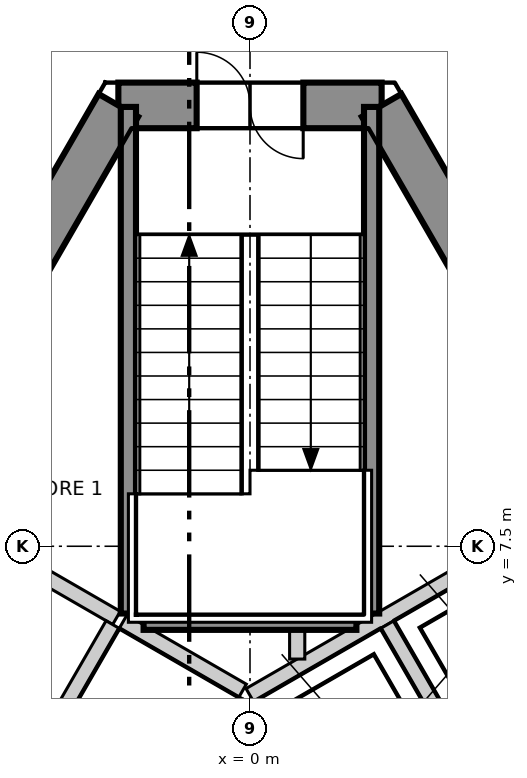
"""IFC4 building model, lengths in metres.
Left out: names, types, materials, properties, quantities, classifications, styles, units other than length and angle.
Written with IfcOpenShell. Run it as: python <this file> out.ifc"""

import sys

from ifc_helpers import new_model, si_unit, direction, frame, frame_2d, origin, place, context, subcontext, project, spatial, polyline, rectangle, outline, extrude, element, fill, save


model = new_model("IFC4")
c1 = context("Model", 3, precision=1e-05, world=origin(), true_north=direction((0.0, 1.0)))
c2 = subcontext(c1, "Body", "Model", "MODEL_VIEW")
j1 = project(units=[si_unit("LENGTHUNIT", "METRE"), si_unit("PLANEANGLEUNIT", "RADIAN")], contexts=[c1])
p1 = place(None, origin())
s1 = spatial("IfcSite", under=j1, at=p1, CompositionType="ELEMENT")
p2 = place(p1, origin())
s2 = spatial("IfcBuilding", under=s1, at=p2, CompositionType="ELEMENT")
p3 = place(p2, frame((0.0, 0.0, 300.7)))
s3 = spatial("IfcBuildingStorey", under=s2, at=p3, CompositionType="ELEMENT", Elevation=300.7)
p4 = place(p3, frame((1.732, 13.3, -0.3), z_axis=(0.0, 0.0, 1.0), x_axis=(-1.0, 0.0, 0.0)))
e1 = element("IfcWall", 1, at=p4, inside=s3, PredefinedType="SHEAR", context=c2, shape_type="SweptSolid", body=[
    extrude(outline(polyline([(-0.173, -0.3), (1.732, -0.3), (3.637, -0.3), (3.291, 0.3), (1.732, 0.3), (0.173, 0.3), (-0.173, -0.3)])), origin(), (0.0, 0.0, 1.0), 3.6),
])
p5 = place(p4, frame((1.032, 0.0, 0.3)))
e2 = element("IfcOpeningElement", 2, at=p5, cuts=e1, PredefinedType="OPENING", context=c2, shape_type="SweptSolid", body=[
    extrude(rectangle(XDim=1.4, YDim=2.1, at=frame_2d((0.7, 1.05))), frame((0.0, 0.31, 0.0), z_axis=(0.0, -1.0, 0.0), x_axis=(1.0, 0.0, 0.0)), (0.0, 0.0, 1.0), 0.62),
])
p6 = place(p3, frame((-1.732, 13.3, -0.3), z_axis=(0.0, 0.0, 1.0), x_axis=(-0.500000539815, -0.866025092122, 0.0)))
e3 = element("IfcWall", 3, at=p6, inside=s3, PredefinedType="SHEAR", context=c2, shape_type="SweptSolid", body=[
    extrude(outline(polyline([(-0.173, -0.3), (1.795, -0.3), (3.763, -0.3), (5.732, -0.3), (7.7, -0.3), (9.668, -0.301), (11.637, -0.301), (13.605, -0.301), (15.573, -0.301), (17.542, -0.301), (19.51, -0.301), (21.478, -0.301), (21.131, 0.3), (19.226, 0.3), (17.321, 0.3), (15.415, 0.3), (13.51, 0.3), (11.605, 0.3), (9.699, 0.3), (7.794, 0.3), (5.889, 0.3), (3.984, 0.3), (2.078, 0.3), (0.173, 0.3), (-0.173, -0.3)])), origin(), (0.0, 0.0, 1.0), 3.6),
])
p7 = place(p6, frame((10.102, 0.0, 0.3)))
e4 = element("IfcOpeningElement", 4, at=p7, cuts=e3, PredefinedType="OPENING", context=c2, shape_type="SweptSolid", body=[
    extrude(rectangle(XDim=1.1, YDim=2.1, at=frame_2d((0.55, 1.05))), frame((0.0, 0.31, 0.0), z_axis=(0.0, -1.0, 0.0), x_axis=(1.0, 0.0, 0.0)), (0.0, 0.0, 1.0), 0.621),
])
p8 = place(p6, frame((16.378, 0.0, 0.3)))
e5 = element("IfcOpeningElement", 5, at=p8, cuts=e3, PredefinedType="OPENING", context=c2, shape_type="SweptSolid", body=[
    extrude(rectangle(XDim=0.9, YDim=2.1, at=frame_2d((0.45, 1.05))), frame((0.0, 0.31, 0.0), z_axis=(0.0, -1.0, 0.0), x_axis=(1.0, 0.0, 0.0)), (0.0, 0.0, 1.0), 0.621),
])
p9 = place(p6, frame((4.026, 0.0, 0.3)))
e6 = element("IfcOpeningElement", 6, at=p9, cuts=e3, PredefinedType="OPENING", context=c2, shape_type="SweptSolid", body=[
    extrude(rectangle(XDim=0.9, YDim=2.1, at=frame_2d((0.45, 1.05))), frame((0.0, 0.31, 0.0), z_axis=(0.0, -1.0, 0.0), x_axis=(1.0, 0.0, 0.0)), (0.0, 0.0, 1.0), 0.621),
])
p10 = place(p3, frame((12.384, -5.15, -0.3), z_axis=(0.0, 0.0, 1.0), x_axis=(-0.500000539815, 0.866025092122, 0.0)))
e7 = element("IfcWall", 7, at=p10, inside=s3, PredefinedType="SHEAR", context=c2, shape_type="SweptSolid", body=[
    extrude(outline(polyline([(-0.173, -0.301), (1.795, -0.301), (3.763, -0.301), (5.731, -0.301), (7.7, -0.301), (9.668, -0.301), (11.636, -0.301), (13.604, -0.3), (15.573, -0.3), (17.541, -0.3), (19.509, -0.3), (21.477, -0.3), (21.131, 0.3), (19.226, 0.3), (17.321, 0.3), (15.415, 0.3), (13.51, 0.3), (11.605, 0.3), (9.699, 0.3), (7.794, 0.3), (5.889, 0.3), (3.984, 0.3), (2.078, 0.3), (0.173, 0.3), (-0.173, -0.301)])), origin(), (0.0, 0.0, 1.0), 3.6),
])
p11 = place(p10, frame((16.328, 0.0, 0.3)))
e8 = element("IfcOpeningElement", 8, at=p11, cuts=e7, PredefinedType="OPENING", context=c2, shape_type="SweptSolid", body=[
    extrude(rectangle(XDim=1.0, YDim=2.1, at=frame_2d((0.5, 1.05))), frame((0.0, 0.31, 0.0), z_axis=(0.0, -1.0, 0.0), x_axis=(1.0, 0.0, 0.0)), (0.0, 0.0, 1.0), 0.621),
])
p12 = place(p10, frame((4.777, 0.0, 0.3)))
e9 = element("IfcOpeningElement", 9, at=p12, cuts=e7, PredefinedType="OPENING", context=c2, shape_type="SweptSolid", body=[
    extrude(rectangle(XDim=0.9, YDim=2.1, at=frame_2d((0.45, 1.05))), frame((0.0, 0.31, 0.0), z_axis=(0.0, -1.0, 0.0), x_axis=(1.0, 0.0, 0.0)), (0.0, 0.0, 1.0), 0.621),
])
p13 = place(p3, frame((-2.453, 27.405, 0.0), z_axis=(0.0, 0.0, 1.0), x_axis=(-0.500000041859, -0.866025379617, 0.0)))
e10 = element("IfcWall", 10, at=p13, inside=s3, PredefinedType="ELEMENTEDWALL", context=c2, shape_type="SweptSolid", body=[
    extrude(rectangle(XDim=44.994, YDim=0.2, at=frame_2d((22.497, 0.0))), origin(), (0.0, 0.0, 1.0), 3.3),
])
p14 = place(p13, frame((2.103, 0.0, 0.9)))
e11 = element("IfcOpeningElement", 11, at=p14, cuts=e10, PredefinedType="OPENING", context=c2, shape_type="SweptSolid", body=[
    extrude(rectangle(XDim=3.7, YDim=2.2, at=frame_2d((1.85, 1.1))), frame((0.0, 0.11, 0.0), z_axis=(0.0, -1.0, 0.0), x_axis=(1.0, 0.0, 0.0)), (0.0, 0.0, 1.0), 0.22),
])
p15 = place(p13, frame((7.404, 0.0, 0.9)))
e12 = element("IfcOpeningElement", 12, at=p15, cuts=e10, PredefinedType="OPENING", context=c2, shape_type="SweptSolid", body=[
    extrude(rectangle(XDim=3.7, YDim=2.2, at=frame_2d((1.85, 1.1))), frame((0.0, 0.11, 0.0), z_axis=(0.0, -1.0, 0.0), x_axis=(1.0, 0.0, 0.0)), (0.0, 0.0, 1.0), 0.22),
])
p16 = place(p13, frame((12.705, 0.0, 0.9)))
e13 = element("IfcOpeningElement", 13, at=p16, cuts=e10, PredefinedType="OPENING", context=c2, shape_type="SweptSolid", body=[
    extrude(rectangle(XDim=3.7, YDim=2.2, at=frame_2d((1.85, 1.1))), frame((0.0, 0.11, 0.0), z_axis=(0.0, -1.0, 0.0), x_axis=(1.0, 0.0, 0.0)), (0.0, 0.0, 1.0), 0.22),
])
p17 = place(p13, frame((18.006, 0.0, 0.9)))
e14 = element("IfcOpeningElement", 14, at=p17, cuts=e10, PredefinedType="OPENING", context=c2, shape_type="SweptSolid", body=[
    extrude(rectangle(XDim=3.7, YDim=2.2, at=frame_2d((1.85, 1.1))), frame((0.0, 0.11, 0.0), z_axis=(0.0, -1.0, 0.0), x_axis=(1.0, 0.0, 0.0)), (0.0, 0.0, 1.0), 0.22),
])
p18 = place(p13, frame((23.307, 0.0, 0.9)))
e15 = element("IfcOpeningElement", 15, at=p18, cuts=e10, PredefinedType="OPENING", context=c2, shape_type="SweptSolid", body=[
    extrude(rectangle(XDim=3.7, YDim=2.2, at=frame_2d((1.85, 1.1))), frame((0.0, 0.11, 0.0), z_axis=(0.0, -1.0, 0.0), x_axis=(1.0, 0.0, 0.0)), (0.0, 0.0, 1.0), 0.22),
])
p19 = place(p13, frame((28.608, 0.0, 0.9)))
e16 = element("IfcOpeningElement", 16, at=p19, cuts=e10, PredefinedType="OPENING", context=c2, shape_type="SweptSolid", body=[
    extrude(rectangle(XDim=3.7, YDim=2.2, at=frame_2d((1.85, 1.1))), frame((0.0, 0.11, 0.0), z_axis=(0.0, -1.0, 0.0), x_axis=(1.0, 0.0, 0.0)), (0.0, 0.0, 1.0), 0.22),
])
p20 = place(p13, frame((33.909, 0.0, 0.9)))
e17 = element("IfcOpeningElement", 17, at=p20, cuts=e10, PredefinedType="OPENING", context=c2, shape_type="SweptSolid", body=[
    extrude(rectangle(XDim=3.7, YDim=2.2, at=frame_2d((1.85, 1.1))), frame((0.0, 0.11, 0.0), z_axis=(0.0, -1.0, 0.0), x_axis=(1.0, 0.0, 0.0)), (0.0, 0.0, 1.0), 0.22),
])
p21 = place(p13, frame((39.21, 0.0, 0.9)))
e18 = element("IfcOpeningElement", 18, at=p21, cuts=e10, PredefinedType="OPENING", context=c2, shape_type="SweptSolid", body=[
    extrude(rectangle(XDim=3.7, YDim=2.2, at=frame_2d((1.85, 1.1))), frame((0.0, 0.11, 0.0), z_axis=(0.0, -1.0, 0.0), x_axis=(1.0, 0.0, 0.0)), (0.0, 0.0, 1.0), 0.22),
])
p22 = place(p3, frame((24.96, -11.578, 0.0), z_axis=(0.0, 0.0, 1.0), x_axis=(-0.500002391419, 0.866024023094, 0.0)))
e19 = element("IfcWall", 19, at=p22, inside=s3, PredefinedType="ELEMENTEDWALL", context=c2, shape_type="SweptSolid", body=[
    extrude(rectangle(XDim=44.994, YDim=0.2, at=frame_2d((22.497, 0.0))), origin(), (0.0, 0.0, 1.0), 3.3),
])
p23 = place(p22, frame((2.103, 0.0, 0.9)))
e20 = element("IfcOpeningElement", 20, at=p23, cuts=e19, PredefinedType="OPENING", context=c2, shape_type="SweptSolid", body=[
    extrude(rectangle(XDim=3.7, YDim=2.2, at=frame_2d((1.85, 1.1))), frame((0.0, 0.11, 0.0), z_axis=(0.0, -1.0, 0.0), x_axis=(1.0, 0.0, 0.0)), (0.0, 0.0, 1.0), 0.22),
])
p24 = place(p22, frame((7.404, 0.0, 0.9)))
e21 = element("IfcOpeningElement", 21, at=p24, cuts=e19, PredefinedType="OPENING", context=c2, shape_type="SweptSolid", body=[
    extrude(rectangle(XDim=3.7, YDim=2.2, at=frame_2d((1.85, 1.1))), frame((0.0, 0.11, 0.0), z_axis=(0.0, -1.0, 0.0), x_axis=(1.0, 0.0, 0.0)), (0.0, 0.0, 1.0), 0.22),
])
p25 = place(p22, frame((12.705, 0.0, 0.9)))
e22 = element("IfcOpeningElement", 22, at=p25, cuts=e19, PredefinedType="OPENING", context=c2, shape_type="SweptSolid", body=[
    extrude(rectangle(XDim=3.7, YDim=2.2, at=frame_2d((1.85, 1.1))), frame((0.0, 0.11, 0.0), z_axis=(0.0, -1.0, 0.0), x_axis=(1.0, 0.0, 0.0)), (0.0, 0.0, 1.0), 0.22),
])
p26 = place(p22, frame((18.006, 0.0, 0.9)))
e23 = element("IfcOpeningElement", 23, at=p26, cuts=e19, PredefinedType="OPENING", context=c2, shape_type="SweptSolid", body=[
    extrude(rectangle(XDim=3.7, YDim=2.2, at=frame_2d((1.85, 1.1))), frame((0.0, 0.11, 0.0), z_axis=(0.0, -1.0, 0.0), x_axis=(1.0, 0.0, 0.0)), (0.0, 0.0, 1.0), 0.22),
])
p27 = place(p22, frame((23.308, 0.0, 0.9)))
e24 = element("IfcOpeningElement", 24, at=p27, cuts=e19, PredefinedType="OPENING", context=c2, shape_type="SweptSolid", body=[
    extrude(rectangle(XDim=3.7, YDim=2.2, at=frame_2d((1.85, 1.1))), frame((0.0, 0.11, 0.0), z_axis=(0.0, -1.0, 0.0), x_axis=(1.0, 0.0, 0.0)), (0.0, 0.0, 1.0), 0.22),
])
p28 = place(p22, frame((28.609, 0.0, 0.9)))
e25 = element("IfcOpeningElement", 25, at=p28, cuts=e19, PredefinedType="OPENING", context=c2, shape_type="SweptSolid", body=[
    extrude(rectangle(XDim=3.7, YDim=2.2, at=frame_2d((1.85, 1.1))), frame((0.0, 0.11, 0.0), z_axis=(0.0, -1.0, 0.0), x_axis=(1.0, 0.0, 0.0)), (0.0, 0.0, 1.0), 0.22),
])
p29 = place(p22, frame((33.91, 0.0, 0.9)))
e26 = element("IfcOpeningElement", 26, at=p29, cuts=e19, PredefinedType="OPENING", context=c2, shape_type="SweptSolid", body=[
    extrude(rectangle(XDim=3.7, YDim=2.2, at=frame_2d((1.85, 1.1))), frame((0.0, 0.11, 0.0), z_axis=(0.0, -1.0, 0.0), x_axis=(1.0, 0.0, 0.0)), (0.0, 0.0, 1.0), 0.22),
])
p30 = place(p22, frame((39.211, 0.0, 0.9)))
e27 = element("IfcOpeningElement", 27, at=p30, cuts=e19, PredefinedType="OPENING", context=c2, shape_type="SweptSolid", body=[
    extrude(rectangle(XDim=3.7, YDim=2.2, at=frame_2d((1.85, 1.1))), frame((0.0, 0.11, 0.0), z_axis=(0.0, -1.0, 0.0), x_axis=(1.0, 0.0, 0.0)), (0.0, 0.0, 1.0), 0.22),
])
p31 = place(p3, frame((-17.679, -10.12, 0.0), z_axis=(0.0, 0.0, 1.0), x_axis=(0.500008955215, 0.866020233427, 0.0)))
e28 = element("IfcWall", 28, at=p31, inside=s3, PredefinedType="PARTITIONING", context=c2, shape_type="SweptSolid", body=[
    extrude(rectangle(XDim=35.357, YDim=0.15, at=frame_2d((17.679, 0.0))), origin(), (0.0, 0.0, 1.0), 3.3),
])
p32 = place(p31, frame((31.307, 0.0, 0.0)))
e29 = element("IfcOpeningElement", 29, at=p32, cuts=e28, PredefinedType="OPENING", context=c2, shape_type="SweptSolid", body=[
    extrude(rectangle(XDim=1.0, YDim=2.1, at=frame_2d((0.5, 1.05))), frame((0.0, 0.085, 0.0), z_axis=(0.0, -1.0, 0.0), x_axis=(1.0, 0.0, 0.0)), (0.0, 0.0, 1.0), 0.17),
])
p33 = place(p31, frame((20.056, 0.0, 0.0)))
e30 = element("IfcOpeningElement", 30, at=p33, cuts=e28, PredefinedType="OPENING", context=c2, shape_type="SweptSolid", body=[
    extrude(rectangle(XDim=1.0, YDim=2.1, at=frame_2d((0.5, 1.05))), frame((0.0, 0.085, 0.0), z_axis=(0.0, -1.0, 0.0), x_axis=(1.0, 0.0, 0.0)), (0.0, 0.0, 1.0), 0.17),
])
p34 = place(p31, frame((13.253, 0.0, 0.0)))
e31 = element("IfcOpeningElement", 31, at=p34, cuts=e28, PredefinedType="OPENING", context=c2, shape_type="SweptSolid", body=[
    extrude(rectangle(XDim=1.0, YDim=2.1, at=frame_2d((0.5, 1.05))), frame((0.0, 0.085, 0.0), z_axis=(0.0, -1.0, 0.0), x_axis=(1.0, 0.0, 0.0)), (0.0, 0.0, 1.0), 0.17),
])
p35 = place(p31, frame((7.653, 0.0, 0.0)))
e32 = element("IfcOpeningElement", 32, at=p35, cuts=e28, PredefinedType="OPENING", context=c2, shape_type="SweptSolid", body=[
    extrude(rectangle(XDim=1.0, YDim=2.1, at=frame_2d((0.5, 1.05))), frame((0.0, 0.085, 0.0), z_axis=(0.0, -1.0, 0.0), x_axis=(1.0, 0.0, 0.0)), (0.0, 0.0, 1.0), 0.17),
])
p36 = place(p31, frame((2.952, 0.0, 0.0)))
e33 = element("IfcOpeningElement", 33, at=p36, cuts=e28, PredefinedType="OPENING", context=c2, shape_type="SweptSolid", body=[
    extrude(rectangle(XDim=1.0, YDim=2.1, at=frame_2d((0.5, 1.05))), frame((0.0, 0.085, 0.0), z_axis=(0.0, -1.0, 0.0), x_axis=(1.0, 0.0, 0.0)), (0.0, 0.0, 1.0), 0.17),
])
p37 = place(p3, frame((0.075, 20.37, 0.0), z_axis=(0.0, 0.0, 1.0), x_axis=(0.500009775255, -0.866019759965, 0.0)))
e34 = element("IfcWall", 34, at=p37, inside=s3, PredefinedType="PARTITIONING", context=c2, shape_type="SweptSolid", body=[
    extrude(rectangle(XDim=35.207, YDim=0.15, at=frame_2d((17.604, 0.0))), origin(), (0.0, 0.0, 1.0), 3.3),
])
p38 = place(p37, frame((31.307, 0.0, 0.0)))
e35 = element("IfcOpeningElement", 35, at=p38, cuts=e34, PredefinedType="OPENING", context=c2, shape_type="SweptSolid", body=[
    extrude(rectangle(XDim=1.0, YDim=2.1, at=frame_2d((0.5, 1.05))), frame((0.0, 0.085, 0.0), z_axis=(0.0, -1.0, 0.0), x_axis=(1.0, 0.0, 0.0)), (0.0, 0.0, 1.0), 0.17),
])
p39 = place(p37, frame((20.355, 0.0, 0.0)))
e36 = element("IfcOpeningElement", 36, at=p39, cuts=e34, PredefinedType="OPENING", context=c2, shape_type="SweptSolid", body=[
    extrude(rectangle(XDim=1.0, YDim=2.1, at=frame_2d((0.5, 1.05))), frame((0.0, 0.085, 0.0), z_axis=(0.0, -1.0, 0.0), x_axis=(1.0, 0.0, 0.0)), (0.0, 0.0, 1.0), 0.17),
])
p40 = place(p37, frame((24.355, 0.0, 0.0)))
e37 = element("IfcOpeningElement", 37, at=p40, cuts=e34, PredefinedType="OPENING", context=c2, shape_type="SweptSolid", body=[
    extrude(rectangle(XDim=0.9, YDim=2.1, at=frame_2d((0.45, 1.05))), frame((0.0, 0.085, 0.0), z_axis=(0.0, -1.0, 0.0), x_axis=(1.0, 0.0, 0.0)), (0.0, 0.0, 1.0), 0.17),
])
p41 = place(p37, frame((22.255, 0.0, 0.0)))
e38 = element("IfcOpeningElement", 38, at=p41, cuts=e34, PredefinedType="OPENING", context=c2, shape_type="SweptSolid", body=[
    extrude(rectangle(XDim=0.9, YDim=2.1, at=frame_2d((0.45, 1.05))), frame((0.0, 0.085, 0.0), z_axis=(0.0, -1.0, 0.0), x_axis=(1.0, 0.0, 0.0)), (0.0, 0.0, 1.0), 0.17),
])
p42 = place(p37, frame((8.453, 0.0, 0.0)))
e39 = element("IfcOpeningElement", 39, at=p42, cuts=e34, PredefinedType="OPENING", context=c2, shape_type="SweptSolid", body=[
    extrude(rectangle(XDim=1.0, YDim=2.1, at=frame_2d((0.5, 1.05))), frame((0.0, 0.085, 0.0), z_axis=(0.0, -1.0, 0.0), x_axis=(1.0, 0.0, 0.0)), (0.0, 0.0, 1.0), 0.17),
])
p43 = place(p37, frame((13.753, 0.0, 0.0)))
e40 = element("IfcOpeningElement", 40, at=p43, cuts=e34, PredefinedType="OPENING", context=c2, shape_type="SweptSolid", body=[
    extrude(rectangle(XDim=0.9, YDim=2.1, at=frame_2d((0.45, 1.05))), frame((0.0, 0.085, 0.0), z_axis=(0.0, -1.0, 0.0), x_axis=(1.0, 0.0, 0.0)), (0.0, 0.0, 1.0), 0.17),
])
p44 = place(p37, frame((11.553, 0.0, 0.0)))
e41 = element("IfcOpeningElement", 41, at=p44, cuts=e34, PredefinedType="OPENING", context=c2, shape_type="SweptSolid", body=[
    extrude(rectangle(XDim=0.9, YDim=2.1, at=frame_2d((0.45, 1.05))), frame((0.0, 0.085, 0.0), z_axis=(0.0, -1.0, 0.0), x_axis=(1.0, 0.0, 0.0)), (0.0, 0.0, 1.0), 0.17),
])
p45 = place(p37, frame((2.951, 0.0, 0.0)))
e42 = element("IfcOpeningElement", 42, at=p45, cuts=e34, PredefinedType="OPENING", context=c2, shape_type="SweptSolid", body=[
    extrude(rectangle(XDim=1.0, YDim=2.1, at=frame_2d((0.5, 1.05))), frame((0.0, 0.085, 0.0), z_axis=(0.0, -1.0, 0.0), x_axis=(1.0, 0.0, 0.0)), (0.0, 0.0, 1.0), 0.17),
])
p46 = place(p3, frame((-0.002, 5.541, 0.0), z_axis=(0.0, 0.0, 1.0), x_axis=(0.86600155993, 0.500041296494, 0.0)))
e43 = element("IfcWall", 43, at=p46, inside=s3, PredefinedType="SOLIDWALL", context=c2, shape_type="SweptSolid", body=[
    extrude(rectangle(XDim=4.132, YDim=0.2, at=frame_2d((2.066, 0.0))), origin(), (0.0, 0.0, 1.0), 3.3),
])
p47 = place(p3, frame((1.578, 2.874, 0.0), z_axis=(0.0, 0.0, 1.0), x_axis=(0.866045911672, 0.499964477614, 0.0)))
e44 = element("IfcWall", 44, at=p47, inside=s3, PredefinedType="SOLIDWALL", context=c2, shape_type="SweptSolid", body=[
    extrude(rectangle(XDim=5.327, YDim=0.2, at=frame_2d((2.663, 0.0))), origin(), (0.0, 0.0, 1.0), 3.3),
])
p48 = place(p47, frame((2.496, 0.0, 0.0)))
e45 = element("IfcOpeningElement", 45, at=p48, cuts=e44, PredefinedType="OPENING", context=c2, shape_type="SweptSolid", body=[
    extrude(rectangle(XDim=1.1, YDim=2.1, at=frame_2d((0.55, 1.05))), frame((0.0, 0.11, 0.0), z_axis=(0.0, -1.0, 0.0), x_axis=(1.0, 0.0, 0.0)), (0.0, 0.0, 1.0), 0.22),
])
p49 = place(p3, frame((1.807, 6.47, 0.0), z_axis=(0.0, 0.0, 1.0), x_axis=(0.50012328804, -0.865954211699, 0.0)))
e46 = element("IfcWall", 46, at=p49, inside=s3, PredefinedType="SOLIDWALL", context=c2, shape_type="SweptSolid", body=[
    extrude(rectangle(XDim=2.9, YDim=0.2, at=frame_2d((1.45, 0.0))), origin(), (0.0, 0.0, 1.0), 3.3),
])
p50 = place(p3, frame((-3.489, 7.557, 0.0), z_axis=(0.0, 0.0, 1.0), x_axis=(0.866010750942, -0.50002537861, 0.0)))
e47 = element("IfcWall", 47, at=p50, inside=s3, PredefinedType="SOLIDWALL", context=c2, shape_type="SweptSolid", body=[
    extrude(rectangle(XDim=2.0, YDim=0.2, at=frame_2d((1.0, 0.0))), origin(), (0.0, 0.0, 1.0), 3.3),
])
p51 = place(p3, frame((-3.257, 3.959, 0.0), z_axis=(0.0, 0.0, 1.0), x_axis=(0.50012328804, 0.865954211699, 0.0)))
e48 = element("IfcWall", 48, at=p51, inside=s3, PredefinedType="SOLIDWALL", context=c2, shape_type="SweptSolid", body=[
    extrude(rectangle(XDim=2.9, YDim=0.2, at=frame_2d((1.45, 0.0))), origin(), (0.0, 0.0, 1.0), 3.3),
])
p52 = place(p3, frame((-1.67, 6.507, 0.0), z_axis=(0.0, 0.0, 1.0), x_axis=(0.865941441609, -0.500145398563, 0.0)))
e49 = element("IfcWall", 49, at=p52, inside=s3, PredefinedType="SOLIDWALL", context=c2, shape_type="SweptSolid", body=[
    extrude(rectangle(XDim=1.815, YDim=0.2, at=frame_2d((0.908, 0.0))), origin(), (0.0, 0.0, 1.0), 3.3),
])
p53 = place(p3, frame((0.621, 6.016, 0.0), z_axis=(0.0, 0.0, 1.0), x_axis=(0.0, 1.0, 0.0)))
e50 = element("IfcWall", 50, at=p53, inside=s3, PredefinedType="SOLIDWALL", context=c2, shape_type="SweptSolid", body=[
    extrude(rectangle(XDim=0.384, YDim=0.2, at=frame_2d((0.192, 0.0))), origin(), (0.0, 0.0, 1.0), 3.3),
])
p54 = place(p3, frame((1.6, 6.615, 0.0), z_axis=(0.0, 0.0, 1.0), x_axis=(0.0, 1.0, 0.0)))
e51 = element("IfcWall", 51, at=p54, inside=s3, PredefinedType="SOLIDWALL", context=c2, shape_type="SweptSolid", body=[
    extrude(rectangle(XDim=6.665, YDim=0.2, at=frame_2d((3.333, 0.0))), origin(), (0.0, 0.0, 1.0), 3.3),
])
p55 = place(p3, frame((-1.4, 6.5, 0.0), z_axis=(0.0, 0.0, 1.0), x_axis=(1.0, 0.0, 0.0)))
e52 = element("IfcWall", 52, at=p55, inside=s3, PredefinedType="SOLIDWALL", context=c2, shape_type="SweptSolid", body=[
    extrude(rectangle(XDim=2.8, YDim=0.2, at=frame_2d((1.4, 0.0))), origin(), (0.0, 0.0, 1.0), 3.3),
])
p56 = place(p3, frame((-1.6, 6.615, 0.0), z_axis=(0.0, 0.0, 1.0), x_axis=(0.0, 1.0, 0.0)))
e53 = element("IfcWall", 53, at=p56, inside=s3, PredefinedType="SOLIDWALL", context=c2, shape_type="SweptSolid", body=[
    extrude(rectangle(XDim=6.665, YDim=0.2, at=frame_2d((3.333, 0.0))), origin(), (0.0, 0.0, 1.0), 3.3),
])
p57 = place(p5, origin())
e54 = element("IfcDoor", 54, at=p57, inside=s3, OperationType="DOUBLE_DOOR_SINGLE_SWING", PredefinedType="DOOR", context=c2, shape_type="SweptSolid", body=[
    extrude(rectangle(XDim=1.4, YDim=2.1, at=frame_2d((0.7, 1.05))), frame((0.0, 0.025, 0.0), z_axis=(0.0, -1.0, 0.0), x_axis=(1.0, 0.0, 0.0)), (0.0, 0.0, 1.0), 0.05),
])
fill(e2, e54)
save(model, sys.argv[1])
